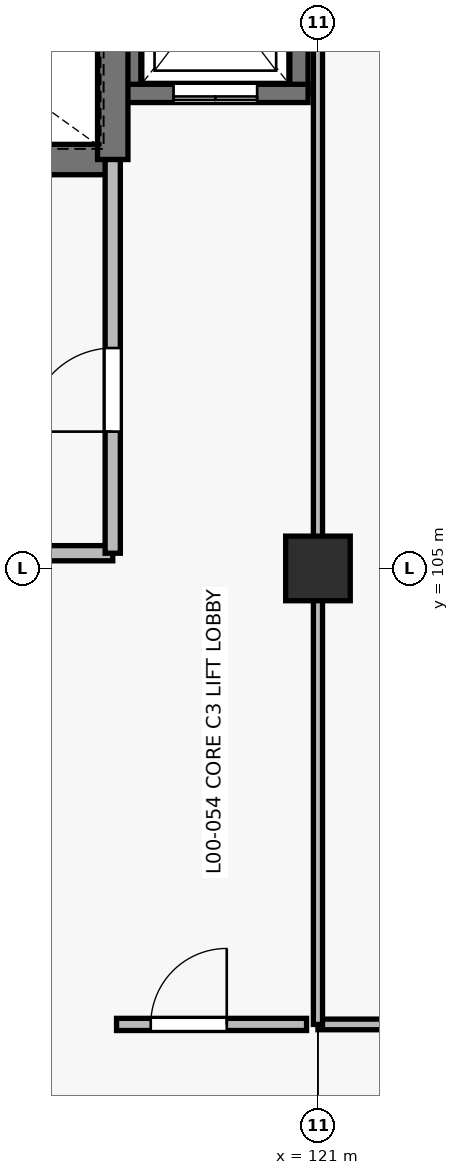
"""IFC4 building model, lengths in metres.
Left out: names, types, materials, properties, quantities, classifications, styles, units other than length and angle.
Written with IfcOpenShell. Run it as: python <this file> out.ifc"""

import sys

from ifc_helpers import new_model, si_unit, direction, frame, frame_2d, origin, origin_2d, place, context, subcontext, project, spatial, rectangle, extrude, element, fill, save


model = new_model("IFC4")
c1 = context("Model", 3, precision=1e-05, world=origin(), true_north=direction((0.0, 1.0)))
c2 = subcontext(c1, "Body", "Model", "MODEL_VIEW")
j1 = project(units=[si_unit("LENGTHUNIT", "METRE"), si_unit("PLANEANGLEUNIT", "RADIAN")], contexts=[c1])
p1 = place(None, origin())
s1 = spatial("IfcSite", under=j1, at=p1, CompositionType="ELEMENT")
p2 = place(p1, origin())
s2 = spatial("IfcBuilding", under=s1, at=p2, CompositionType="ELEMENT")
p3 = place(p2, origin())
s3 = spatial("IfcBuildingStorey", under=s2, at=p3, CompositionType="ELEMENT", Elevation=0.0)
p4 = place(p3, frame((121.0, 105.0, 0.0), z_axis=(0.0, 0.0, 1.0), x_axis=(1.0, 0.0, 0.0)))
e1 = element("IfcColumn", 1, at=p4, inside=s3, PredefinedType="COLUMN", context=c2, shape_type="SweptSolid", body=[
    extrude(rectangle(XDim=0.85, YDim=0.85, at=origin_2d()), origin(), (0.0, 0.0, 1.0), 4.8),
])
for number, where, z_axis, x_axis in (
    (2, (118.55, 111.25, 0.0), (0.0, 0.0, 1.0), (0.0, 1.0, 0.0)),
    (3, (120.75, 113.95, 0.0), (0.0, 0.0, 1.0), (0.0, -1.0, 0.0)),
):
    element("IfcWall", number, at=place(p3, frame(where, z_axis=z_axis, x_axis=x_axis)), inside=s3, PredefinedType="SHEAR", context=c2, shape_type="SweptSolid", body=[
        extrude(rectangle(XDim=2.7, YDim=0.24, at=frame_2d((1.35, 0.0))), origin(), (0.0, 0.0, 1.0), 4.8),
    ])
p5 = place(p3, frame((120.87, 111.25, 0.0), z_axis=(0.0, 0.0, 1.0), x_axis=(-1.0, 0.0, 0.0)))
e4 = element("IfcWall", 4, at=p5, inside=s3, PredefinedType="SHEAR", context=c2, shape_type="SweptSolid", body=[
    extrude(rectangle(XDim=2.44, YDim=0.24, at=frame_2d((1.22, 0.0))), origin(), (0.0, 0.0, 1.0), 4.8),
])
p6 = place(p5, frame((0.67, 0.0, 0.0)))
e5 = element("IfcOpeningElement", 5, at=p6, cuts=e4, PredefinedType="OPENING", context=c2, shape_type="SweptSolid", body=[
    extrude(rectangle(XDim=1.1, YDim=2.15, at=frame_2d((0.55, 1.075))), frame((0.0, 0.13, 0.0), z_axis=(0.0, -1.0, 0.0), x_axis=(1.0, 0.0, 0.0)), (0.0, 0.0, 1.0), 0.26),
])
p7 = place(p3, frame((111.2, 110.38, 0.0), z_axis=(0.0, 0.0, 1.0), x_axis=(1.0, 0.0, 0.0)))
e6 = element("IfcWall", 6, at=p7, inside=s3, PredefinedType="SHEAR", context=c2, shape_type="SweptSolid", body=[
    extrude(rectangle(XDim=7.1, YDim=0.4, at=frame_2d((3.55, 0.0))), origin(), (0.0, 0.0, 1.0), 4.8),
])
p8 = place(p7, frame((0.3, 0.0, 0.0)))
e7 = element("IfcOpeningElement", 7, at=p8, cuts=e6, PredefinedType="OPENING", context=c2, shape_type="SweptSolid", body=[
    extrude(rectangle(XDim=1.0, YDim=2.15, at=frame_2d((0.5, 1.075))), frame((0.0, 0.21, 0.0), z_axis=(0.0, -1.0, 0.0), x_axis=(1.0, 0.0, 0.0)), (0.0, 0.0, 1.0), 0.42),
])
p9 = place(p3, frame((118.3, 110.38, 0.0), z_axis=(0.0, 0.0, 1.0), x_axis=(0.0, 1.0, 0.0)))
e8 = element("IfcWall", 8, at=p9, inside=s3, PredefinedType="SHEAR", context=c2, shape_type="SweptSolid", body=[
    extrude(rectangle(XDim=4.24, YDim=0.4, at=frame_2d((2.12, 0.0))), origin(), (0.0, 0.0, 1.0), 4.8),
])
p10 = place(p3, frame((111.2, 105.2, 0.0), z_axis=(0.0, 0.0, 1.0), x_axis=(1.0, 0.0, 0.0)))
e9 = element("IfcWall", 9, at=p10, inside=s3, PredefinedType="PARTITIONING", context=c2, shape_type="SweptSolid", body=[
    extrude(rectangle(XDim=7.1, YDim=0.2, at=frame_2d((3.55, 0.0))), origin(), (0.0, 0.0, 1.0), 3.525),
])
p11 = place(p10, frame((2.2, 0.0, 0.0)))
e10 = element("IfcOpeningElement", 10, at=p11, cuts=e9, PredefinedType="OPENING", context=c2, shape_type="SweptSolid", body=[
    extrude(rectangle(XDim=1.6, YDim=2.2, at=frame_2d((0.8, 1.1))), frame((0.0, 0.11, 0.0), z_axis=(0.0, -1.0, 0.0), x_axis=(1.0, 0.0, 0.0)), (0.0, 0.0, 1.0), 0.22),
])
p12 = place(p3, frame((118.3, 105.2, 0.0), z_axis=(0.0, 0.0, 1.0), x_axis=(0.0, 1.0, 0.0)))
e11 = element("IfcWall", 11, at=p12, inside=s3, PredefinedType="PARTITIONING", context=c2, shape_type="SweptSolid", body=[
    extrude(rectangle(XDim=5.18, YDim=0.2, at=frame_2d((2.59, 0.0))), origin(), (0.0, 0.0, 1.0), 3.625),
])
p13 = place(p12, frame((1.6, 0.0, 0.0)))
e12 = element("IfcOpeningElement", 12, at=p13, cuts=e11, PredefinedType="OPENING", context=c2, shape_type="SweptSolid", body=[
    extrude(rectangle(XDim=1.1, YDim=2.15, at=frame_2d((0.55, 1.075))), frame((0.0, 0.11, 0.0), z_axis=(0.0, -1.0, 0.0), x_axis=(1.0, 0.0, 0.0)), (0.0, 0.0, 1.0), 0.22),
])
p14 = place(p3, frame((118.35, 99.0, 0.0), z_axis=(0.0, 0.0, 1.0), x_axis=(1.0, 0.0, 0.0)))
e13 = element("IfcWall", 13, at=p14, inside=s3, PredefinedType="PARTITIONING", context=c2, shape_type="SweptSolid", body=[
    extrude(rectangle(XDim=2.5, YDim=0.16, at=frame_2d((1.25, 0.0))), origin(), (0.0, 0.0, 1.0), 3.525),
])
p15 = place(p14, frame((0.45, 0.0, 0.0)))
e14 = element("IfcOpeningElement", 14, at=p15, cuts=e13, PredefinedType="OPENING", context=c2, shape_type="SweptSolid", body=[
    extrude(rectangle(XDim=1.0, YDim=2.15, at=frame_2d((0.5, 1.075))), frame((0.0, 0.09, 0.0), z_axis=(0.0, -1.0, 0.0), x_axis=(1.0, 0.0, 0.0)), (0.0, 0.0, 1.0), 0.18),
])
p16 = place(p3, frame((121.0, 99.0, 0.0), z_axis=(0.0, 0.0, 1.0), x_axis=(1.0, 0.0, 0.0)))
e15 = element("IfcWall", 15, at=p16, inside=s3, PredefinedType="PARTITIONING", context=c2, shape_type="SweptSolid", body=[
    extrude(rectangle(XDim=16.0, YDim=0.14, at=frame_2d((8.0, 0.0))), origin(), (0.0, 0.0, 1.0), 3.525),
])
p17 = place(p16, frame((7.51, 0.0, 0.0)))
e16 = element("IfcOpeningElement", 16, at=p17, cuts=e15, PredefinedType="OPENING", context=c2, shape_type="SweptSolid", body=[
    extrude(rectangle(XDim=0.98, YDim=2.1, at=frame_2d((0.49, 1.05))), frame((0.0, 0.08, 0.0), z_axis=(0.0, -1.0, 0.0), x_axis=(1.0, 0.0, 0.0)), (0.0, 0.0, 1.0), 0.16),
])
p18 = place(p3, frame((121.0, 99.0, 0.0), z_axis=(0.0, 0.0, 1.0), x_axis=(0.0, 1.0, 0.0)))
e17 = element("IfcWall", 17, at=p18, inside=s3, PredefinedType="PARTITIONING", context=c2, shape_type="SweptSolid", body=[
    extrude(rectangle(XDim=15.75, YDim=0.12, at=frame_2d((7.875, 0.0))), origin(), (0.0, 0.0, 1.0), 3.525),
])
p19 = place(p6, origin())
e18 = element("IfcDoor", 18, at=p19, inside=s3, OperationType="DOUBLE_DOOR_SLIDING", PredefinedType="USERDEFINED", context=c2, shape_type="SweptSolid", body=[
    extrude(rectangle(XDim=1.1, YDim=2.15, at=frame_2d((0.55, 1.075))), frame((0.0, 0.025, 0.0), z_axis=(0.0, -1.0, 0.0), x_axis=(1.0, 0.0, 0.0)), (0.0, 0.0, 1.0), 0.05),
])
fill(e5, e18)
p20 = place(p13, origin())
e19 = element("IfcDoor", 19, at=p20, inside=s3, OperationType="SINGLE_SWING_LEFT", PredefinedType="DOOR", context=c2, shape_type="SweptSolid", body=[
    extrude(rectangle(XDim=1.1, YDim=2.15, at=frame_2d((0.55, 1.075))), frame((0.0, 0.025, 0.0), z_axis=(0.0, -1.0, 0.0), x_axis=(1.0, 0.0, 0.0)), (0.0, 0.0, 1.0), 0.05),
])
fill(e12, e19)
p21 = place(p15, origin())
e20 = element("IfcDoor", 20, at=p21, inside=s3, OperationType="SINGLE_SWING_RIGHT", PredefinedType="DOOR", context=c2, shape_type="SweptSolid", body=[
    extrude(rectangle(XDim=1.0, YDim=2.15, at=frame_2d((0.5, 1.075))), frame((0.0, 0.025, 0.0), z_axis=(0.0, -1.0, 0.0), x_axis=(1.0, 0.0, 0.0)), (0.0, 0.0, 1.0), 0.05),
])
fill(e14, e20)
save(model, sys.argv[1])
